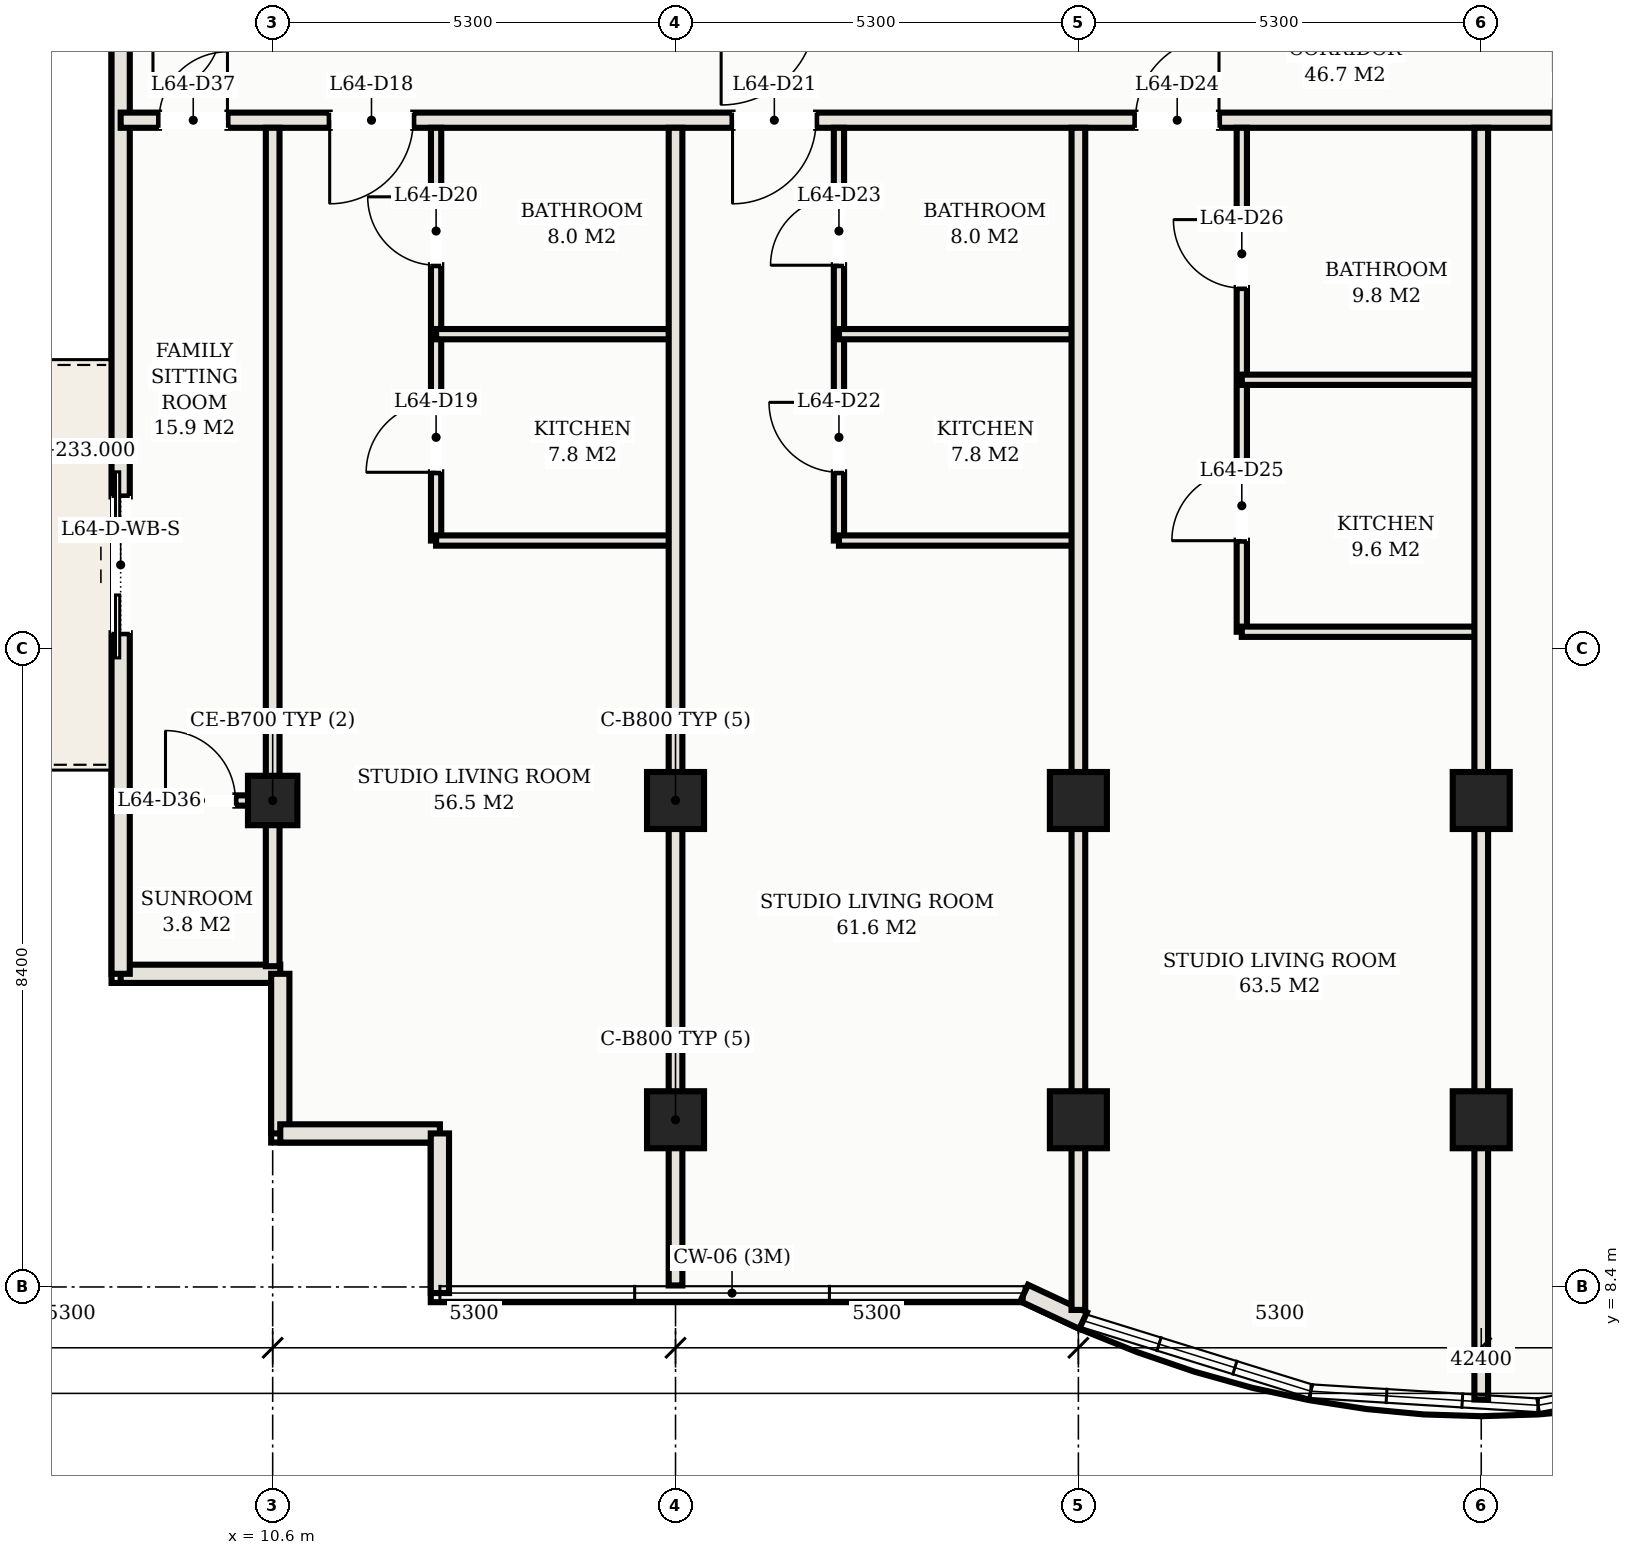
"""IFC4 building model, lengths in metres.
Left out: names, types, materials, properties, quantities, classifications, styles, units other than length and angle.
Written with IfcOpenShell. Run it as: python <this file> out.ifc"""

import sys

from ifc_helpers import new_model, si_unit, direction, frame, frame_2d, origin, origin_2d, place, context, subcontext, project, spatial, rectangle, hollow_rectangle, extrude, element, fill, save


model = new_model("IFC4")
c1 = context("Model", 3, precision=1e-05, world=origin(), true_north=direction((0.0, 1.0)))
c2 = subcontext(c1, "Body", "Model", "MODEL_VIEW")
j1 = project(units=[si_unit("LENGTHUNIT", "METRE"), si_unit("PLANEANGLEUNIT", "RADIAN")], contexts=[c1])
p1 = place(None, origin())
s1 = spatial("IfcSite", under=j1, at=p1, CompositionType="ELEMENT")
p2 = place(p1, origin())
s2 = spatial("IfcBuilding", under=s1, at=p2, CompositionType="ELEMENT")
p3 = place(p2, frame((0.0, 0.0, 233.0)))
s3 = spatial("IfcBuildingStorey", under=s2, at=p3, CompositionType="ELEMENT", Elevation=233.0)
for number, where, z_axis, x_axis in (
    (1, (15.9, 14.8, 0.0), (0.0, 0.0, 1.0), (1.0, 0.0, 0.0)),
    (2, (15.9, 10.6, 0.0), (0.0, 0.0, 1.0), (1.0, 0.0, 0.0)),
    (3, (21.2, 14.8, 0.0), (0.0, 0.0, 1.0), (1.0, 0.0, 0.0)),
    (4, (21.2, 10.6, 0.0), (0.0, 0.0, 1.0), (1.0, 0.0, 0.0)),
    (5, (26.5, 14.8, 0.0), (0.0, 0.0, 1.0), (1.0, 0.0, 0.0)),
    (6, (26.5, 10.6, 0.0), (0.0, 0.0, 1.0), (1.0, 0.0, 0.0)),
):
    element("IfcColumn", number, at=place(p3, frame(where, z_axis=z_axis, x_axis=x_axis)), inside=s3, PredefinedType="COLUMN", context=c2, shape_type="SweptSolid", body=[
        extrude(hollow_rectangle(XDim=0.75, YDim=0.75, WallThickness=0.025, at=origin_2d()), origin(), (0.0, 0.0, 1.0), 3.3),
    ])
p4 = place(p3, frame((10.6, 14.8, 0.0), z_axis=(0.0, 0.0, 1.0), x_axis=(1.0, 0.0, 0.0)))
e7 = element("IfcColumn", 7, at=p4, inside=s3, PredefinedType="COLUMN", context=c2, shape_type="SweptSolid", body=[
    extrude(hollow_rectangle(XDim=0.65, YDim=0.65, WallThickness=0.022, at=origin_2d()), origin(), (0.0, 0.0, 1.0), 3.3),
])
p5 = place(p3, frame((8.6, 12.52, 0.0), z_axis=(0.0, 0.0, 1.0), x_axis=(1.0, 0.0, 0.0)))
e8 = element("IfcWall", 8, at=p5, inside=s3, PredefinedType="SOLIDWALL", context=c2, shape_type="SweptSolid", body=[
    extrude(rectangle(XDim=2.1, YDim=0.24, at=frame_2d((1.05, 0.0))), origin(), (0.0, 0.0, 1.0), 3.11),
])
for number, where, z_axis, x_axis in (
    (9, (10.7, 12.52, 0.0), (0.0, 0.0, 1.0), (0.0, -1.0, 0.0)),
    (10, (10.7, 10.42, 0.0), (0.0, 0.0, 1.0), (1.0, 0.0, 0.0)),
):
    element("IfcWall", number, at=place(p3, frame(where, z_axis=z_axis, x_axis=x_axis)), inside=s3, PredefinedType="SOLIDWALL", context=c2, shape_type="SweptSolid", body=[
        extrude(rectangle(XDim=2.1, YDim=0.24, at=frame_2d((1.05, 0.0))), origin(), (0.0, 0.0, 1.0), 3.11),
    ])
p6 = place(p3, frame((12.8, 10.42, 0.0), z_axis=(0.0, 0.0, 1.0), x_axis=(0.0, -1.0, 0.0)))
e11 = element("IfcWall", 11, at=p6, inside=s3, PredefinedType="SOLIDWALL", context=c2, shape_type="SweptSolid", body=[
    extrude(rectangle(XDim=2.1, YDim=0.24, at=frame_2d((1.05, 0.0))), origin(), (0.0, 0.0, 1.0), 3.11),
])
p7 = place(p3, frame((20.487, 8.32, 0.0), z_axis=(0.0, 0.0, 1.0), x_axis=(0.906190424584, -0.422869855147, 0.0)))
e12 = element("IfcWall", 12, at=p7, inside=s3, PredefinedType="SOLIDWALL", context=c2, shape_type="SweptSolid", body=[
    extrude(rectangle(XDim=0.856, YDim=0.24, at=frame_2d((0.428, 0.0))), origin(), (0.0, 0.0, 1.0), 3.11),
])
p8 = place(p3, frame((8.6, 38.53, 0.0), z_axis=(0.0, 0.0, 1.0), x_axis=(0.0, -1.0, 0.0)))
e13 = element("IfcWall", 13, at=p8, inside=s3, PredefinedType="SOLIDWALL", context=c2, shape_type="SweptSolid", body=[
    extrude(rectangle(XDim=26.01, YDim=0.24, at=frame_2d((13.005, 0.0))), origin(), (0.0, 0.0, 1.0), 3.11),
])
p9 = place(p8, frame((19.73, 0.0, 0.0)))
e14 = element("IfcOpeningElement", 14, at=p9, cuts=e13, PredefinedType="OPENING", context=c2, shape_type="SweptSolid", body=[
    extrude(rectangle(XDim=1.8, YDim=2.2, at=frame_2d((0.9, 1.1))), frame((0.0, 0.13, 0.0), z_axis=(0.0, -1.0, 0.0), x_axis=(1.0, 0.0, 0.0)), (0.0, 0.0, 1.0), 0.26),
])
p10 = place(p8, frame((0.45, 0.0, 0.75)))
e15 = element("IfcOpeningElement", 15, at=p10, cuts=e13, PredefinedType="OPENING", context=c2, shape_type="SweptSolid", body=[
    extrude(rectangle(XDim=2.1, YDim=1.65, at=frame_2d((1.05, 0.825))), frame((0.0, 0.13, 0.0), z_axis=(0.0, -1.0, 0.0), x_axis=(1.0, 0.0, 0.0)), (0.0, 0.0, 1.0), 0.26),
])
p11 = place(p3, frame((8.6, 23.75, 0.0), z_axis=(0.0, 0.0, 1.0), x_axis=(1.0, 0.0, 0.0)))
e16 = element("IfcWall", 16, at=p11, inside=s3, PredefinedType="PARTITIONING", context=c2, shape_type="SweptSolid", body=[
    extrude(rectangle(XDim=35.8, YDim=0.2, at=frame_2d((17.9, 0.0))), origin(), (0.0, 0.0, 1.0), 2.45),
])
p12 = place(p11, frame((2.75, 0.0, 0.0)))
e17 = element("IfcOpeningElement", 17, at=p12, cuts=e16, PredefinedType="OPENING", context=c2, shape_type="SweptSolid", body=[
    extrude(rectangle(XDim=1.1, YDim=2.25, at=frame_2d((0.55, 1.125))), frame((0.0, 0.11, 0.0), z_axis=(0.0, -1.0, 0.0), x_axis=(1.0, 0.0, 0.0)), (0.0, 0.0, 1.0), 0.22),
])
p13 = place(p11, frame((8.05, 0.0, 0.0)))
e18 = element("IfcOpeningElement", 18, at=p13, cuts=e16, PredefinedType="OPENING", context=c2, shape_type="SweptSolid", body=[
    extrude(rectangle(XDim=1.1, YDim=2.25, at=frame_2d((0.55, 1.125))), frame((0.0, 0.11, 0.0), z_axis=(0.0, -1.0, 0.0), x_axis=(1.0, 0.0, 0.0)), (0.0, 0.0, 1.0), 0.22),
])
p14 = place(p11, frame((13.35, 0.0, 0.0)))
e19 = element("IfcOpeningElement", 19, at=p14, cuts=e16, PredefinedType="OPENING", context=c2, shape_type="SweptSolid", body=[
    extrude(rectangle(XDim=1.1, YDim=2.25, at=frame_2d((0.55, 1.125))), frame((0.0, 0.11, 0.0), z_axis=(0.0, -1.0, 0.0), x_axis=(1.0, 0.0, 0.0)), (0.0, 0.0, 1.0), 0.22),
])
p15 = place(p11, frame((18.85, 0.0, 0.0)))
e20 = element("IfcOpeningElement", 20, at=p15, cuts=e16, PredefinedType="OPENING", context=c2, shape_type="SweptSolid", body=[
    extrude(rectangle(XDim=1.1, YDim=2.25, at=frame_2d((0.55, 1.125))), frame((0.0, 0.11, 0.0), z_axis=(0.0, -1.0, 0.0), x_axis=(1.0, 0.0, 0.0)), (0.0, 0.0, 1.0), 0.22),
])
p16 = place(p11, frame((23.95, 0.0, 0.0)))
e21 = element("IfcOpeningElement", 21, at=p16, cuts=e16, PredefinedType="OPENING", context=c2, shape_type="SweptSolid", body=[
    extrude(rectangle(XDim=1.1, YDim=2.25, at=frame_2d((0.55, 1.125))), frame((0.0, 0.11, 0.0), z_axis=(0.0, -1.0, 0.0), x_axis=(1.0, 0.0, 0.0)), (0.0, 0.0, 1.0), 0.22),
])
p17 = place(p11, frame((29.25, 0.0, 0.0)))
e22 = element("IfcOpeningElement", 22, at=p17, cuts=e16, PredefinedType="OPENING", context=c2, shape_type="SweptSolid", body=[
    extrude(rectangle(XDim=1.1, YDim=2.25, at=frame_2d((0.55, 1.125))), frame((0.0, 0.11, 0.0), z_axis=(0.0, -1.0, 0.0), x_axis=(1.0, 0.0, 0.0)), (0.0, 0.0, 1.0), 0.22),
])
p18 = place(p11, frame((0.505, 0.0, 0.0)))
e23 = element("IfcOpeningElement", 23, at=p18, cuts=e16, PredefinedType="OPENING", context=c2, shape_type="SweptSolid", body=[
    extrude(rectangle(XDim=0.9, YDim=2.15, at=frame_2d((0.45, 1.075))), frame((0.0, 0.11, 0.0), z_axis=(0.0, -1.0, 0.0), x_axis=(1.0, 0.0, 0.0)), (0.0, 0.0, 1.0), 0.22),
])
p19 = place(p11, frame((34.395, 0.0, 0.0)))
e24 = element("IfcOpeningElement", 24, at=p19, cuts=e16, PredefinedType="OPENING", context=c2, shape_type="SweptSolid", body=[
    extrude(rectangle(XDim=0.9, YDim=2.15, at=frame_2d((0.45, 1.075))), frame((0.0, 0.11, 0.0), z_axis=(0.0, -1.0, 0.0), x_axis=(1.0, 0.0, 0.0)), (0.0, 0.0, 1.0), 0.22),
])
p20 = place(p3, frame((10.6, 12.62, 0.0), z_axis=(0.0, 0.0, 1.0), x_axis=(0.0, 1.0, 0.0)))
e25 = element("IfcWall", 25, at=p20, inside=s3, PredefinedType="PARTITIONING", context=c2, shape_type="SweptSolid", body=[
    extrude(rectangle(XDim=11.03, YDim=0.18, at=frame_2d((5.515, 0.0))), origin(), (0.0, 0.0, 1.0), 2.45),
])
p21 = place(p3, frame((12.75, 18.22, 0.0), z_axis=(0.0, 0.0, 1.0), x_axis=(0.0, 1.0, 0.0)))
e26 = element("IfcWall", 26, at=p21, inside=s3, PredefinedType="PARTITIONING", context=c2, shape_type="SweptSolid", body=[
    extrude(rectangle(XDim=5.43, YDim=0.135, at=frame_2d((2.715, 0.0))), origin(), (0.0, 0.0, 1.0), 2.45),
])
p22 = place(p21, frame((0.898, 0.0, 0.0)))
e27 = element("IfcOpeningElement", 27, at=p22, cuts=e26, PredefinedType="OPENING", context=c2, shape_type="SweptSolid", body=[
    extrude(rectangle(XDim=0.92, YDim=2.15, at=frame_2d((0.46, 1.075))), frame((0.0, 0.078, 0.0), z_axis=(0.0, -1.0, 0.0), x_axis=(1.0, 0.0, 0.0)), (0.0, 0.0, 1.0), 0.155),
])
p23 = place(p21, frame((3.622, 0.0, 0.0)))
e28 = element("IfcOpeningElement", 28, at=p23, cuts=e26, PredefinedType="OPENING", context=c2, shape_type="SweptSolid", body=[
    extrude(rectangle(XDim=0.9, YDim=2.15, at=frame_2d((0.45, 1.075))), frame((0.0, 0.078, 0.0), z_axis=(0.0, -1.0, 0.0), x_axis=(1.0, 0.0, 0.0)), (0.0, 0.0, 1.0), 0.155),
])
for number, where, z_axis, x_axis in (
    (29, (12.75, 18.22, 0.0), (0.0, 0.0, 1.0), (1.0, 0.0, 0.0)),
    (30, (12.75, 20.935, 0.0), (0.0, 0.0, 1.0), (1.0, 0.0, 0.0)),
):
    element("IfcWall", number, at=place(p3, frame(where, z_axis=z_axis, x_axis=x_axis)), inside=s3, PredefinedType="PARTITIONING", context=c2, shape_type="SweptSolid", body=[
        extrude(rectangle(XDim=3.15, YDim=0.135, at=frame_2d((1.575, 0.0))), origin(), (0.0, 0.0, 1.0), 2.45),
    ])
p24 = place(p3, frame((15.9, 8.42, 0.0), z_axis=(0.0, 0.0, 1.0), x_axis=(0.0, 1.0, 0.0)))
e31 = element("IfcWall", 31, at=p24, inside=s3, PredefinedType="PARTITIONING", context=c2, shape_type="SweptSolid", body=[
    extrude(rectangle(XDim=15.23, YDim=0.18, at=frame_2d((7.615, 0.0))), origin(), (0.0, 0.0, 1.0), 2.45),
])
p25 = place(p3, frame((18.05, 18.22, 0.0), z_axis=(0.0, 0.0, 1.0), x_axis=(0.0, 1.0, 0.0)))
e32 = element("IfcWall", 32, at=p25, inside=s3, PredefinedType="PARTITIONING", context=c2, shape_type="SweptSolid", body=[
    extrude(rectangle(XDim=5.43, YDim=0.135, at=frame_2d((2.715, 0.0))), origin(), (0.0, 0.0, 1.0), 2.45),
])
p26 = place(p25, frame((0.898, 0.0, 0.0)))
e33 = element("IfcOpeningElement", 33, at=p26, cuts=e32, PredefinedType="OPENING", context=c2, shape_type="SweptSolid", body=[
    extrude(rectangle(XDim=0.92, YDim=2.15, at=frame_2d((0.46, 1.075))), frame((0.0, 0.078, 0.0), z_axis=(0.0, -1.0, 0.0), x_axis=(1.0, 0.0, 0.0)), (0.0, 0.0, 1.0), 0.155),
])
p27 = place(p25, frame((3.622, 0.0, 0.0)))
e34 = element("IfcOpeningElement", 34, at=p27, cuts=e32, PredefinedType="OPENING", context=c2, shape_type="SweptSolid", body=[
    extrude(rectangle(XDim=0.9, YDim=2.15, at=frame_2d((0.45, 1.075))), frame((0.0, 0.078, 0.0), z_axis=(0.0, -1.0, 0.0), x_axis=(1.0, 0.0, 0.0)), (0.0, 0.0, 1.0), 0.155),
])
for number, where, z_axis, x_axis in (
    (35, (18.05, 18.22, 0.0), (0.0, 0.0, 1.0), (1.0, 0.0, 0.0)),
    (36, (18.05, 20.935, 0.0), (0.0, 0.0, 1.0), (1.0, 0.0, 0.0)),
):
    element("IfcWall", number, at=place(p3, frame(where, z_axis=z_axis, x_axis=x_axis)), inside=s3, PredefinedType="PARTITIONING", context=c2, shape_type="SweptSolid", body=[
        extrude(rectangle(XDim=3.15, YDim=0.135, at=frame_2d((1.575, 0.0))), origin(), (0.0, 0.0, 1.0), 2.45),
    ])
p28 = place(p3, frame((21.2, 8.098, 0.0), z_axis=(0.0, 0.0, 1.0), x_axis=(0.0, 1.0, 0.0)))
e37 = element("IfcWall", 37, at=p28, inside=s3, PredefinedType="PARTITIONING", context=c2, shape_type="SweptSolid", body=[
    extrude(rectangle(XDim=15.552, YDim=0.18, at=frame_2d((7.776, 0.0))), origin(), (0.0, 0.0, 1.0), 2.45),
])
p29 = place(p3, frame((23.35, 17.02, 0.0), z_axis=(0.0, 0.0, 1.0), x_axis=(0.0, 1.0, 0.0)))
e38 = element("IfcWall", 38, at=p29, inside=s3, PredefinedType="PARTITIONING", context=c2, shape_type="SweptSolid", body=[
    extrude(rectangle(XDim=6.63, YDim=0.135, at=frame_2d((3.315, 0.0))), origin(), (0.0, 0.0, 1.0), 2.45),
])
p30 = place(p29, frame((1.198, 0.0, 0.0)))
e39 = element("IfcOpeningElement", 39, at=p30, cuts=e38, PredefinedType="OPENING", context=c2, shape_type="SweptSolid", body=[
    extrude(rectangle(XDim=0.92, YDim=2.15, at=frame_2d((0.46, 1.075))), frame((0.0, 0.078, 0.0), z_axis=(0.0, -1.0, 0.0), x_axis=(1.0, 0.0, 0.0)), (0.0, 0.0, 1.0), 0.155),
])
p31 = place(p29, frame((4.522, 0.0, 0.0)))
e40 = element("IfcOpeningElement", 40, at=p31, cuts=e38, PredefinedType="OPENING", context=c2, shape_type="SweptSolid", body=[
    extrude(rectangle(XDim=0.9, YDim=2.15, at=frame_2d((0.45, 1.075))), frame((0.0, 0.078, 0.0), z_axis=(0.0, -1.0, 0.0), x_axis=(1.0, 0.0, 0.0)), (0.0, 0.0, 1.0), 0.155),
])
for number, where, z_axis, x_axis in (
    (41, (23.35, 17.02, 0.0), (0.0, 0.0, 1.0), (1.0, 0.0, 0.0)),
    (42, (23.35, 20.335, 0.0), (0.0, 0.0, 1.0), (1.0, 0.0, 0.0)),
):
    element("IfcWall", number, at=place(p3, frame(where, z_axis=z_axis, x_axis=x_axis)), inside=s3, PredefinedType="PARTITIONING", context=c2, shape_type="SweptSolid", body=[
        extrude(rectangle(XDim=3.15, YDim=0.135, at=frame_2d((1.575, 0.0))), origin(), (0.0, 0.0, 1.0), 2.45),
    ])
p32 = place(p3, frame((26.5, 6.92, 0.0), z_axis=(0.0, 0.0, 1.0), x_axis=(0.0, 1.0, 0.0)))
e43 = element("IfcWall", 43, at=p32, inside=s3, PredefinedType="PARTITIONING", context=c2, shape_type="SweptSolid", body=[
    extrude(rectangle(XDim=16.73, YDim=0.18, at=frame_2d((8.365, 0.0))), origin(), (0.0, 0.0, 1.0), 2.45),
])
p33 = place(p3, frame((8.7, 14.8, 0.0), z_axis=(0.0, 0.0, 1.0), x_axis=(1.0, 0.0, 0.0)))
e44 = element("IfcWall", 44, at=p33, inside=s3, PredefinedType="PARTITIONING", context=c2, shape_type="SweptSolid", body=[
    extrude(rectangle(XDim=1.9, YDim=0.135, at=frame_2d((0.95, 0.0))), origin(), (0.0, 0.0, 1.0), 2.45),
])
p34 = place(p33, frame((0.49, 0.0, 0.0)))
e45 = element("IfcOpeningElement", 45, at=p34, cuts=e44, PredefinedType="OPENING", context=c2, shape_type="SweptSolid", body=[
    extrude(rectangle(XDim=0.92, YDim=2.15, at=frame_2d((0.46, 1.075))), frame((0.0, 0.078, 0.0), z_axis=(0.0, -1.0, 0.0), x_axis=(1.0, 0.0, 0.0)), (0.0, 0.0, 1.0), 0.155),
])
p35 = place(p9, frame((1.8, 0.0, 0.0), z_axis=(0.0, 0.0, 1.0), x_axis=(-1.0, 0.0, 0.0)))
e46 = element("IfcDoor", 46, at=p35, inside=s3, OperationType="DOUBLE_DOOR_SLIDING", PredefinedType="DOOR", context=c2, shape_type="SweptSolid", body=[
    extrude(rectangle(XDim=1.8, YDim=2.2, at=frame_2d((0.9, 1.1))), frame((0.0, 0.025, 0.0), z_axis=(0.0, -1.0, 0.0), x_axis=(1.0, 0.0, 0.0)), (0.0, 0.0, 1.0), 0.05),
])
fill(e14, e46)
p36 = place(p12, frame((1.1, 0.0, 0.0), z_axis=(0.0, 0.0, 1.0), x_axis=(-1.0, 0.0, 0.0)))
e47 = element("IfcDoor", 47, at=p36, inside=s3, OperationType="SINGLE_SWING_RIGHT", PredefinedType="DOOR", context=c2, shape_type="SweptSolid", body=[
    extrude(rectangle(XDim=1.1, YDim=2.25, at=frame_2d((0.55, 1.125))), frame((0.0, 0.025, 0.0), z_axis=(0.0, -1.0, 0.0), x_axis=(1.0, 0.0, 0.0)), (0.0, 0.0, 1.0), 0.05),
])
fill(e17, e47)
p37 = place(p22, origin())
e48 = element("IfcDoor", 48, at=p37, inside=s3, OperationType="SINGLE_SWING_LEFT", PredefinedType="DOOR", context=c2, shape_type="SweptSolid", body=[
    extrude(rectangle(XDim=0.92, YDim=2.15, at=frame_2d((0.46, 1.075))), frame((0.0, 0.025, 0.0), z_axis=(0.0, -1.0, 0.0), x_axis=(1.0, 0.0, 0.0)), (0.0, 0.0, 1.0), 0.05),
])
fill(e27, e48)
p38 = place(p23, origin())
e49 = element("IfcDoor", 49, at=p38, inside=s3, OperationType="SINGLE_SWING_RIGHT", PredefinedType="DOOR", context=c2, shape_type="SweptSolid", body=[
    extrude(rectangle(XDim=0.9, YDim=2.15, at=frame_2d((0.45, 1.075))), frame((0.0, 0.025, 0.0), z_axis=(0.0, -1.0, 0.0), x_axis=(1.0, 0.0, 0.0)), (0.0, 0.0, 1.0), 0.05),
])
fill(e28, e49)
p39 = place(p13, frame((1.1, 0.0, 0.0), z_axis=(0.0, 0.0, 1.0), x_axis=(-1.0, 0.0, 0.0)))
e50 = element("IfcDoor", 50, at=p39, inside=s3, OperationType="SINGLE_SWING_RIGHT", PredefinedType="DOOR", context=c2, shape_type="SweptSolid", body=[
    extrude(rectangle(XDim=1.1, YDim=2.25, at=frame_2d((0.55, 1.125))), frame((0.0, 0.025, 0.0), z_axis=(0.0, -1.0, 0.0), x_axis=(1.0, 0.0, 0.0)), (0.0, 0.0, 1.0), 0.05),
])
fill(e18, e50)
p40 = place(p26, origin())
e51 = element("IfcDoor", 51, at=p40, inside=s3, OperationType="SINGLE_SWING_RIGHT", PredefinedType="DOOR", context=c2, shape_type="SweptSolid", body=[
    extrude(rectangle(XDim=0.92, YDim=2.15, at=frame_2d((0.46, 1.075))), frame((0.0, 0.025, 0.0), z_axis=(0.0, -1.0, 0.0), x_axis=(1.0, 0.0, 0.0)), (0.0, 0.0, 1.0), 0.05),
])
fill(e33, e51)
p41 = place(p27, origin())
e52 = element("IfcDoor", 52, at=p41, inside=s3, OperationType="SINGLE_SWING_LEFT", PredefinedType="DOOR", context=c2, shape_type="SweptSolid", body=[
    extrude(rectangle(XDim=0.9, YDim=2.15, at=frame_2d((0.45, 1.075))), frame((0.0, 0.025, 0.0), z_axis=(0.0, -1.0, 0.0), x_axis=(1.0, 0.0, 0.0)), (0.0, 0.0, 1.0), 0.05),
])
fill(e34, e52)
p42 = place(p14, origin())
e53 = element("IfcDoor", 53, at=p42, inside=s3, OperationType="SINGLE_SWING_RIGHT", PredefinedType="DOOR", context=c2, shape_type="SweptSolid", body=[
    extrude(rectangle(XDim=1.1, YDim=2.25, at=frame_2d((0.55, 1.125))), frame((0.0, 0.025, 0.0), z_axis=(0.0, -1.0, 0.0), x_axis=(1.0, 0.0, 0.0)), (0.0, 0.0, 1.0), 0.05),
])
fill(e19, e53)
p43 = place(p30, origin())
e54 = element("IfcDoor", 54, at=p43, inside=s3, OperationType="SINGLE_SWING_LEFT", PredefinedType="DOOR", context=c2, shape_type="SweptSolid", body=[
    extrude(rectangle(XDim=0.92, YDim=2.15, at=frame_2d((0.46, 1.075))), frame((0.0, 0.025, 0.0), z_axis=(0.0, -1.0, 0.0), x_axis=(1.0, 0.0, 0.0)), (0.0, 0.0, 1.0), 0.05),
])
fill(e39, e54)
p44 = place(p31, origin())
e55 = element("IfcDoor", 55, at=p44, inside=s3, OperationType="SINGLE_SWING_RIGHT", PredefinedType="DOOR", context=c2, shape_type="SweptSolid", body=[
    extrude(rectangle(XDim=0.9, YDim=2.15, at=frame_2d((0.45, 1.075))), frame((0.0, 0.025, 0.0), z_axis=(0.0, -1.0, 0.0), x_axis=(1.0, 0.0, 0.0)), (0.0, 0.0, 1.0), 0.05),
])
fill(e40, e55)
p45 = place(p34, origin())
e56 = element("IfcDoor", 56, at=p45, inside=s3, OperationType="SINGLE_SWING_LEFT", PredefinedType="DOOR", context=c2, shape_type="SweptSolid", body=[
    extrude(rectangle(XDim=0.92, YDim=2.15, at=frame_2d((0.46, 1.075))), frame((0.0, 0.025, 0.0), z_axis=(0.0, -1.0, 0.0), x_axis=(1.0, 0.0, 0.0)), (0.0, 0.0, 1.0), 0.05),
])
fill(e45, e56)
p46 = place(p18, origin())
e57 = element("IfcDoor", 57, at=p46, inside=s3, OperationType="SINGLE_SWING_RIGHT", PredefinedType="DOOR", context=c2, shape_type="SweptSolid", body=[
    extrude(rectangle(XDim=0.9, YDim=2.15, at=frame_2d((0.45, 1.075))), frame((0.0, 0.025, 0.0), z_axis=(0.0, -1.0, 0.0), x_axis=(1.0, 0.0, 0.0)), (0.0, 0.0, 1.0), 0.05),
])
fill(e23, e57)
save(model, sys.argv[1])
